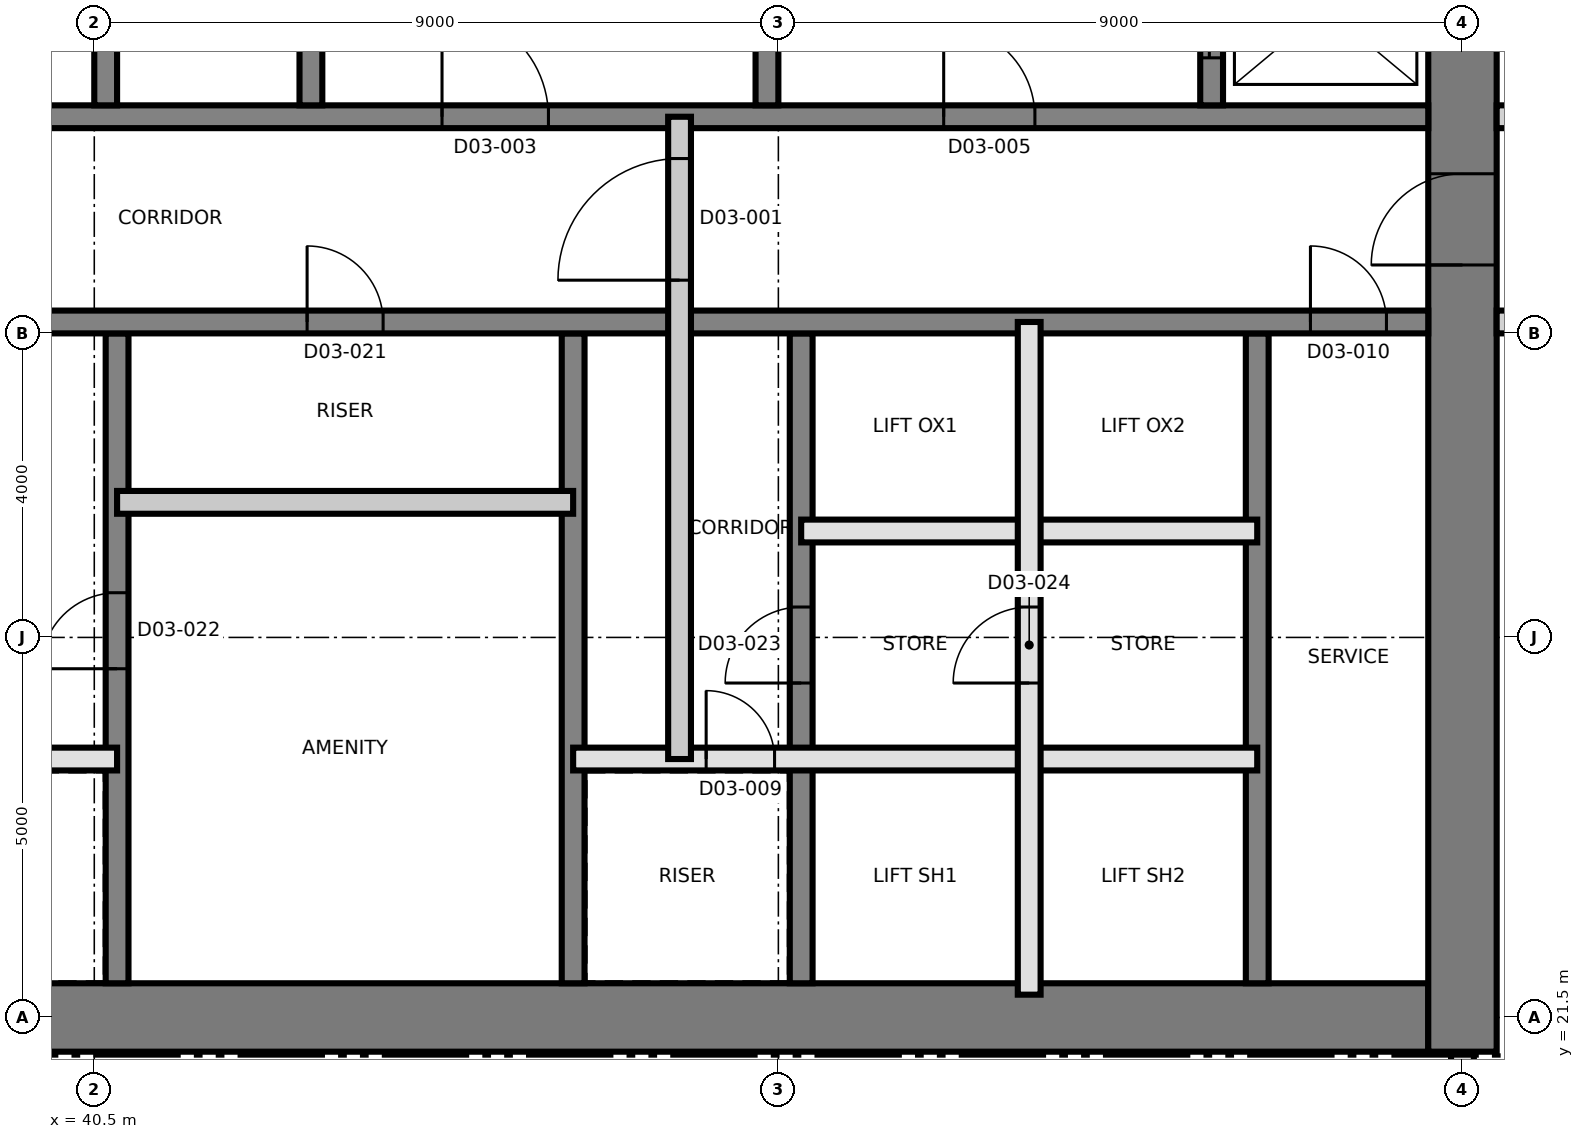
"""IFC4 building model, lengths in metres.
Left out: names, types, materials, properties, quantities, classifications, styles, units other than length and angle.
Written with IfcOpenShell. Run it as: python <this file> out.ifc"""

import sys

from ifc_helpers import new_model, si_unit, direction, frame, frame_2d, origin, place, context, subcontext, project, spatial, rectangle, extrude, element, fill, save


model = new_model("IFC4")
c1 = context("Model", 3, precision=1e-05, world=origin(), true_north=direction((0.0, 1.0)))
c2 = subcontext(c1, "Body", "Model", "MODEL_VIEW")
j1 = project(units=[si_unit("LENGTHUNIT", "METRE"), si_unit("PLANEANGLEUNIT", "RADIAN")], contexts=[c1])
p1 = place(None, origin())
s1 = spatial("IfcSite", under=j1, at=p1, CompositionType="ELEMENT")
p2 = place(p1, origin())
s2 = spatial("IfcBuilding", under=s1, at=p2, CompositionType="ELEMENT")
p3 = place(p2, frame((0.0, 0.0, 52.0)))
s3 = spatial("IfcBuildingStorey", under=s2, at=p3, CompositionType="ELEMENT", Elevation=52.0)
p4 = place(p3, frame((31.05, 21.5, 0.0), z_axis=(0.0, 0.0, 1.0), x_axis=(1.0, 0.0, 0.0)))
e1 = element("IfcWall", 1, at=p4, inside=s3, PredefinedType="SHEAR", context=c2, shape_type="SweptSolid", body=[
    extrude(rectangle(XDim=27.0, YDim=0.9, at=frame_2d((13.5, 0.0))), origin(), (0.0, 0.0, 1.0), 3.7),
])
p5 = place(p3, frame((58.5, 21.05, 0.0), z_axis=(0.0, 0.0, 1.0), x_axis=(0.0, 1.0, 0.0)))
e2 = element("IfcWall", 2, at=p5, inside=s3, PredefinedType="SHEAR", context=c2, shape_type="SweptSolid", body=[
    extrude(rectangle(XDim=18.9, YDim=0.9, at=frame_2d((9.45, 0.0))), origin(), (0.0, 0.0, 1.0), 3.7),
])
p6 = place(p5, frame((10.35, 0.0, 0.0)))
e3 = element("IfcOpeningElement", 3, at=p6, cuts=e2, PredefinedType="OPENING", context=c2, shape_type="SweptSolid", body=[
    extrude(rectangle(XDim=1.2, YDim=2.1, at=frame_2d((0.6, 1.05))), frame((0.0, 0.46, 0.0), z_axis=(0.0, -1.0, 0.0), x_axis=(1.0, 0.0, 0.0)), (0.0, 0.0, 1.0), 0.92),
])
p7 = place(p3, frame((40.8, 21.95, 0.0), z_axis=(0.0, 0.0, 1.0), x_axis=(0.0, 1.0, 0.0)))
e4 = element("IfcWall", 4, at=p7, inside=s3, PredefinedType="SHEAR", context=c2, shape_type="SweptSolid", body=[
    extrude(rectangle(XDim=8.55, YDim=0.3, at=frame_2d((4.275, 0.0))), origin(), (0.0, 0.0, 1.0), 3.7),
])
p8 = place(p7, frame((4.138, 0.0, 0.0)))
e5 = element("IfcOpeningElement", 5, at=p8, cuts=e4, PredefinedType="OPENING", context=c2, shape_type="SweptSolid", body=[
    extrude(rectangle(XDim=1.0, YDim=2.1, at=frame_2d((0.5, 1.05))), frame((0.0, 0.16, 0.0), z_axis=(0.0, -1.0, 0.0), x_axis=(1.0, 0.0, 0.0)), (0.0, 0.0, 1.0), 0.32),
])
p9 = place(p3, frame((46.8, 21.95, 0.0), z_axis=(0.0, 0.0, 1.0), x_axis=(0.0, 1.0, 0.0)))
e6 = element("IfcWall", 6, at=p9, inside=s3, PredefinedType="SHEAR", context=c2, shape_type="SweptSolid", body=[
    extrude(rectangle(XDim=8.55, YDim=0.3, at=frame_2d((4.275, 0.0))), origin(), (0.0, 0.0, 1.0), 3.7),
])
p10 = place(p3, frame((49.8, 21.95, 0.0), z_axis=(0.0, 0.0, 1.0), x_axis=(0.0, 1.0, 0.0)))
e7 = element("IfcWall", 7, at=p10, inside=s3, PredefinedType="SHEAR", context=c2, shape_type="SweptSolid", body=[
    extrude(rectangle(XDim=8.55, YDim=0.3, at=frame_2d((4.275, 0.0))), origin(), (0.0, 0.0, 1.0), 3.7),
])
p11 = place(p10, frame((3.95, 0.0, 0.0)))
e8 = element("IfcOpeningElement", 8, at=p11, cuts=e7, PredefinedType="OPENING", context=c2, shape_type="SweptSolid", body=[
    extrude(rectangle(XDim=1.0, YDim=2.1, at=frame_2d((0.5, 1.05))), frame((0.0, 0.16, 0.0), z_axis=(0.0, -1.0, 0.0), x_axis=(1.0, 0.0, 0.0)), (0.0, 0.0, 1.0), 0.32),
])
p12 = place(p3, frame((55.8, 21.95, 0.0), z_axis=(0.0, 0.0, 1.0), x_axis=(0.0, 1.0, 0.0)))
e9 = element("IfcWall", 9, at=p12, inside=s3, PredefinedType="SHEAR", context=c2, shape_type="SweptSolid", body=[
    extrude(rectangle(XDim=8.55, YDim=0.3, at=frame_2d((4.275, 0.0))), origin(), (0.0, 0.0, 1.0), 3.7),
])
p13 = place(p3, frame((31.95, 30.65, 0.0), z_axis=(0.0, 0.0, 1.0), x_axis=(1.0, 0.0, 0.0)))
e10 = element("IfcWall", 10, at=p13, inside=s3, PredefinedType="SHEAR", context=c2, shape_type="SweptSolid", body=[
    extrude(rectangle(XDim=26.1, YDim=0.3, at=frame_2d((13.05, 0.0))), origin(), (0.0, 0.0, 1.0), 3.7),
])
p14 = place(p13, frame((24.55, 0.0, 0.0)))
e11 = element("IfcOpeningElement", 11, at=p14, cuts=e10, PredefinedType="OPENING", context=c2, shape_type="SweptSolid", body=[
    extrude(rectangle(XDim=1.0, YDim=2.1, at=frame_2d((0.5, 1.05))), frame((0.0, 0.16, 0.0), z_axis=(0.0, -1.0, 0.0), x_axis=(1.0, 0.0, 0.0)), (0.0, 0.0, 1.0), 0.32),
])
p15 = place(p13, frame((11.35, 0.0, 0.0)))
e12 = element("IfcOpeningElement", 12, at=p15, cuts=e10, PredefinedType="OPENING", context=c2, shape_type="SweptSolid", body=[
    extrude(rectangle(XDim=1.0, YDim=2.1, at=frame_2d((0.5, 1.05))), frame((0.0, 0.16, 0.0), z_axis=(0.0, -1.0, 0.0), x_axis=(1.0, 0.0, 0.0)), (0.0, 0.0, 1.0), 0.32),
])
p16 = place(p3, frame((31.95, 33.35, 0.0), z_axis=(0.0, 0.0, 1.0), x_axis=(1.0, 0.0, 0.0)))
e13 = element("IfcWall", 13, at=p16, inside=s3, PredefinedType="SHEAR", context=c2, shape_type="SweptSolid", body=[
    extrude(rectangle(XDim=26.1, YDim=0.3, at=frame_2d((13.05, 0.0))), origin(), (0.0, 0.0, 1.0), 3.7),
])
p17 = place(p16, frame((13.125, 0.0, 0.0)))
e14 = element("IfcOpeningElement", 14, at=p17, cuts=e13, PredefinedType="OPENING", context=c2, shape_type="SweptSolid", body=[
    extrude(rectangle(XDim=1.4, YDim=2.1, at=frame_2d((0.7, 1.05))), frame((0.0, 0.16, 0.0), z_axis=(0.0, -1.0, 0.0), x_axis=(1.0, 0.0, 0.0)), (0.0, 0.0, 1.0), 0.32),
])
p18 = place(p16, frame((5.175, 0.0, 0.0)))
e15 = element("IfcOpeningElement", 15, at=p18, cuts=e13, PredefinedType="OPENING", context=c2, shape_type="SweptSolid", body=[
    extrude(rectangle(XDim=1.2, YDim=2.1, at=frame_2d((0.6, 1.05))), frame((0.0, 0.16, 0.0), z_axis=(0.0, -1.0, 0.0), x_axis=(1.0, 0.0, 0.0)), (0.0, 0.0, 1.0), 0.32),
])
p19 = place(p16, frame((19.725, 0.0, 0.0)))
e16 = element("IfcOpeningElement", 16, at=p19, cuts=e13, PredefinedType="OPENING", context=c2, shape_type="SweptSolid", body=[
    extrude(rectangle(XDim=1.2, YDim=2.1, at=frame_2d((0.6, 1.05))), frame((0.0, 0.16, 0.0), z_axis=(0.0, -1.0, 0.0), x_axis=(1.0, 0.0, 0.0)), (0.0, 0.0, 1.0), 0.32),
])
for number, where, z_axis, x_axis in (
    (17, (40.65, 33.5, 0.0), (0.0, 0.0, 1.0), (0.0, 1.0, 0.0)),
    (18, (43.35, 33.5, 0.0), (0.0, 0.0, 1.0), (0.0, 1.0, 0.0)),
    (19, (49.35, 33.5, 0.0), (0.0, 0.0, 1.0), (0.0, 1.0, 0.0)),
):
    element("IfcWall", number, at=place(p3, frame(where, z_axis=z_axis, x_axis=x_axis)), inside=s3, PredefinedType="SHEAR", context=c2, shape_type="SweptSolid", body=[
        extrude(rectangle(XDim=5.55, YDim=0.3, at=frame_2d((2.775, 0.0))), origin(), (0.0, 0.0, 1.0), 3.7),
    ])
p20 = place(p3, frame((55.2, 33.5, 0.0), z_axis=(0.0, 0.0, 1.0), x_axis=(0.0, 1.0, 0.0)))
e20 = element("IfcWall", 20, at=p20, inside=s3, PredefinedType="SHEAR", context=c2, shape_type="SweptSolid", body=[
    extrude(rectangle(XDim=2.55, YDim=0.3, at=frame_2d((1.275, 0.0))), origin(), (0.0, 0.0, 1.0), 3.7),
])
p21 = place(p20, frame((0.625, 0.0, 0.0)))
e21 = element("IfcOpeningElement", 21, at=p21, cuts=e20, PredefinedType="OPENING", context=c2, shape_type="SweptSolid", body=[
    extrude(rectangle(XDim=1.3, YDim=2.4, at=frame_2d((0.65, 1.2))), frame((0.0, 0.16, 0.0), z_axis=(0.0, -1.0, 0.0), x_axis=(1.0, 0.0, 0.0)), (0.0, 0.0, 1.0), 0.32),
])
p22 = place(p3, frame((31.8, 24.9, 0.0), z_axis=(0.0, 0.0, 1.0), x_axis=(1.0, 0.0, 0.0)))
e22 = element("IfcWall", 22, at=p22, inside=s3, PredefinedType="SOLIDWALL", context=c2, shape_type="SweptSolid", body=[
    extrude(rectangle(XDim=9.0, YDim=0.3, at=frame_2d((4.5, 0.0))), origin(), (0.0, 0.0, 1.0), 3.4),
])
p23 = place(p22, frame((7.05, 0.0, 0.0)))
e23 = element("IfcOpeningElement", 23, at=p23, cuts=e22, PredefinedType="OPENING", context=c2, shape_type="SweptSolid", body=[
    extrude(rectangle(XDim=0.9, YDim=2.1, at=frame_2d((0.45, 1.05))), frame((0.0, 0.16, 0.0), z_axis=(0.0, -1.0, 0.0), x_axis=(1.0, 0.0, 0.0)), (0.0, 0.0, 1.0), 0.32),
])
p24 = place(p22, frame((0.95, 0.0, 0.0)))
e24 = element("IfcOpeningElement", 24, at=p24, cuts=e22, PredefinedType="OPENING", context=c2, shape_type="SweptSolid", body=[
    extrude(rectangle(XDim=1.1, YDim=2.4, at=frame_2d((0.55, 1.2))), frame((0.0, 0.16, 0.0), z_axis=(0.0, -1.0, 0.0), x_axis=(1.0, 0.0, 0.0)), (0.0, 0.0, 1.0), 0.32),
])
p25 = place(p22, frame((3.95, 0.0, 0.0)))
e25 = element("IfcOpeningElement", 25, at=p25, cuts=e22, PredefinedType="OPENING", context=c2, shape_type="SweptSolid", body=[
    extrude(rectangle(XDim=1.1, YDim=2.4, at=frame_2d((0.55, 1.2))), frame((0.0, 0.16, 0.0), z_axis=(0.0, -1.0, 0.0), x_axis=(1.0, 0.0, 0.0)), (0.0, 0.0, 1.0), 0.32),
])
p26 = place(p3, frame((46.8, 24.9, 0.0), z_axis=(0.0, 0.0, 1.0), x_axis=(1.0, 0.0, 0.0)))
e26 = element("IfcWall", 26, at=p26, inside=s3, PredefinedType="SOLIDWALL", context=c2, shape_type="SweptSolid", body=[
    extrude(rectangle(XDim=9.0, YDim=0.3, at=frame_2d((4.5, 0.0))), origin(), (0.0, 0.0, 1.0), 3.4),
])
p27 = place(p26, frame((1.75, 0.0, 0.0)))
e27 = element("IfcOpeningElement", 27, at=p27, cuts=e26, PredefinedType="OPENING", context=c2, shape_type="SweptSolid", body=[
    extrude(rectangle(XDim=0.9, YDim=2.1, at=frame_2d((0.45, 1.05))), frame((0.0, 0.16, 0.0), z_axis=(0.0, -1.0, 0.0), x_axis=(1.0, 0.0, 0.0)), (0.0, 0.0, 1.0), 0.32),
])
p28 = place(p3, frame((49.8, 27.9, 0.0), z_axis=(0.0, 0.0, 1.0), x_axis=(1.0, 0.0, 0.0)))
e28 = element("IfcWall", 28, at=p28, inside=s3, PredefinedType="SOLIDWALL", context=c2, shape_type="SweptSolid", body=[
    extrude(rectangle(XDim=6.0, YDim=0.3, at=frame_2d((3.0, 0.0))), origin(), (0.0, 0.0, 1.0), 3.4),
])
p29 = place(p3, frame((40.8, 28.277, 0.0), z_axis=(0.0, 0.0, 1.0), x_axis=(1.0, 0.0, 0.0)))
e29 = element("IfcWall", 29, at=p29, inside=s3, PredefinedType="PARTITIONING", context=c2, shape_type="SweptSolid", body=[
    extrude(rectangle(XDim=6.0, YDim=0.3, at=frame_2d((3.0, 0.0))), origin(), (0.0, 0.0, 1.0), 3.4),
])
p30 = place(p3, frame((48.2, 24.9, 0.0), z_axis=(0.0, 0.0, 1.0), x_axis=(0.0, 1.0, 0.0)))
e30 = element("IfcWall", 30, at=p30, inside=s3, PredefinedType="PARTITIONING", context=c2, shape_type="SweptSolid", body=[
    extrude(rectangle(XDim=8.45, YDim=0.3, at=frame_2d((4.225, 0.0))), origin(), (0.0, 0.0, 1.0), 3.4),
])
p31 = place(p30, frame((6.3, 0.0, 0.0)))
e31 = element("IfcOpeningElement", 31, at=p31, cuts=e30, PredefinedType="OPENING", context=c2, shape_type="SweptSolid", body=[
    extrude(rectangle(XDim=1.6, YDim=2.1, at=frame_2d((0.8, 1.05))), frame((0.0, 0.16, 0.0), z_axis=(0.0, -1.0, 0.0), x_axis=(1.0, 0.0, 0.0)), (0.0, 0.0, 1.0), 0.32),
])
p32 = place(p3, frame((52.8, 21.8, 0.0), z_axis=(0.0, 0.0, 1.0), x_axis=(0.0, 1.0, 0.0)))
e32 = element("IfcWall", 32, at=p32, inside=s3, PredefinedType="SOLIDWALL", context=c2, shape_type="SweptSolid", body=[
    extrude(rectangle(XDim=8.85, YDim=0.3, at=frame_2d((4.425, 0.0))), origin(), (0.0, 0.0, 1.0), 3.4),
])
p33 = place(p32, frame((4.1, 0.0, 0.0)))
e33 = element("IfcOpeningElement", 33, at=p33, cuts=e32, PredefinedType="OPENING", context=c2, shape_type="SweptSolid", body=[
    extrude(rectangle(XDim=1.0, YDim=2.1, at=frame_2d((0.5, 1.05))), frame((0.0, 0.16, 0.0), z_axis=(0.0, -1.0, 0.0), x_axis=(1.0, 0.0, 0.0)), (0.0, 0.0, 1.0), 0.32),
])
p34 = place(p3, frame((58.95, 30.65, 0.0), z_axis=(0.0, 0.0, 1.0), x_axis=(1.0, 0.0, 0.0)))
e34 = element("IfcWall", 34, at=p34, inside=s3, PredefinedType="PARTITIONING", context=c2, shape_type="SweptSolid", body=[
    extrude(rectangle(XDim=26.38, YDim=0.3, at=frame_2d((13.19, 0.0))), origin(), (0.0, 0.0, 1.0), 3.4),
])
p35 = place(p34, frame((0.685, 0.0, 0.0)))
e35 = element("IfcOpeningElement", 35, at=p35, cuts=e34, PredefinedType="OPENING", context=c2, shape_type="SweptSolid", body=[
    extrude(rectangle(XDim=1.2, YDim=2.1, at=frame_2d((0.6, 1.05))), frame((0.0, 0.16, 0.0), z_axis=(0.0, -1.0, 0.0), x_axis=(1.0, 0.0, 0.0)), (0.0, 0.0, 1.0), 0.32),
])
p36 = place(p34, frame((3.935, 0.0, 0.0)))
e36 = element("IfcOpeningElement", 36, at=p36, cuts=e34, PredefinedType="OPENING", context=c2, shape_type="SweptSolid", body=[
    extrude(rectangle(XDim=1.0, YDim=2.1, at=frame_2d((0.5, 1.05))), frame((0.0, 0.16, 0.0), z_axis=(0.0, -1.0, 0.0), x_axis=(1.0, 0.0, 0.0)), (0.0, 0.0, 1.0), 0.32),
])
p37 = place(p34, frame((9.685, 0.0, 0.0)))
e37 = element("IfcOpeningElement", 37, at=p37, cuts=e34, PredefinedType="OPENING", context=c2, shape_type="SweptSolid", body=[
    extrude(rectangle(XDim=1.2, YDim=2.1, at=frame_2d((0.6, 1.05))), frame((0.0, 0.16, 0.0), z_axis=(0.0, -1.0, 0.0), x_axis=(1.0, 0.0, 0.0)), (0.0, 0.0, 1.0), 0.32),
])
p38 = place(p34, frame((12.935, 0.0, 0.0)))
e38 = element("IfcOpeningElement", 38, at=p38, cuts=e34, PredefinedType="OPENING", context=c2, shape_type="SweptSolid", body=[
    extrude(rectangle(XDim=1.0, YDim=2.1, at=frame_2d((0.5, 1.05))), frame((0.0, 0.16, 0.0), z_axis=(0.0, -1.0, 0.0), x_axis=(1.0, 0.0, 0.0)), (0.0, 0.0, 1.0), 0.32),
])
p39 = place(p34, frame((21.55, 0.0, 0.0)))
e39 = element("IfcOpeningElement", 39, at=p39, cuts=e34, PredefinedType="OPENING", context=c2, shape_type="SweptSolid", body=[
    extrude(rectangle(XDim=1.0, YDim=2.4, at=frame_2d((0.5, 1.2))), frame((0.0, 0.16, 0.0), z_axis=(0.0, -1.0, 0.0), x_axis=(1.0, 0.0, 0.0)), (0.0, 0.0, 1.0), 0.32),
])
p40 = place(p3, frame((58.95, 33.35, 0.0), z_axis=(0.0, 0.0, 1.0), x_axis=(1.0, 0.0, 0.0)))
e40 = element("IfcWall", 40, at=p40, inside=s3, PredefinedType="PARTITIONING", context=c2, shape_type="SweptSolid", body=[
    extrude(rectangle(XDim=26.38, YDim=0.3, at=frame_2d((13.19, 0.0))), origin(), (0.0, 0.0, 1.0), 3.4),
])
p41 = place(p40, frame((0.685, 0.0, 0.0)))
e41 = element("IfcOpeningElement", 41, at=p41, cuts=e40, PredefinedType="OPENING", context=c2, shape_type="SweptSolid", body=[
    extrude(rectangle(XDim=1.2, YDim=2.1, at=frame_2d((0.6, 1.05))), frame((0.0, 0.16, 0.0), z_axis=(0.0, -1.0, 0.0), x_axis=(1.0, 0.0, 0.0)), (0.0, 0.0, 1.0), 0.32),
])
p42 = place(p40, frame((3.935, 0.0, 0.0)))
e42 = element("IfcOpeningElement", 42, at=p42, cuts=e40, PredefinedType="OPENING", context=c2, shape_type="SweptSolid", body=[
    extrude(rectangle(XDim=1.0, YDim=2.1, at=frame_2d((0.5, 1.05))), frame((0.0, 0.16, 0.0), z_axis=(0.0, -1.0, 0.0), x_axis=(1.0, 0.0, 0.0)), (0.0, 0.0, 1.0), 0.32),
])
p43 = place(p40, frame((14.2, 0.0, 0.0)))
e43 = element("IfcOpeningElement", 43, at=p43, cuts=e40, PredefinedType="OPENING", context=c2, shape_type="SweptSolid", body=[
    extrude(rectangle(XDim=1.0, YDim=2.4, at=frame_2d((0.5, 1.2))), frame((0.0, 0.16, 0.0), z_axis=(0.0, -1.0, 0.0), x_axis=(1.0, 0.0, 0.0)), (0.0, 0.0, 1.0), 0.32),
])
p44 = place(p40, frame((19.25, 0.0, 0.0)))
e44 = element("IfcOpeningElement", 44, at=p44, cuts=e40, PredefinedType="OPENING", context=c2, shape_type="SweptSolid", body=[
    extrude(rectangle(XDim=1.2, YDim=2.1, at=frame_2d((0.6, 1.05))), frame((0.0, 0.16, 0.0), z_axis=(0.0, -1.0, 0.0), x_axis=(1.0, 0.0, 0.0)), (0.0, 0.0, 1.0), 0.32),
])
p45 = place(p40, frame((22.5, 0.0, 0.0)))
e45 = element("IfcOpeningElement", 45, at=p45, cuts=e40, PredefinedType="OPENING", context=c2, shape_type="SweptSolid", body=[
    extrude(rectangle(XDim=1.0, YDim=2.1, at=frame_2d((0.5, 1.05))), frame((0.0, 0.16, 0.0), z_axis=(0.0, -1.0, 0.0), x_axis=(1.0, 0.0, 0.0)), (0.0, 0.0, 1.0), 0.32),
])
p46 = place(p3, frame((58.5, 19.705, 0.0), z_axis=(0.0, 0.0, 1.0), x_axis=(0.0, 1.0, 0.0)))
e46 = element("IfcWall", 46, at=p46, inside=s3, PredefinedType="PARTITIONING", context=c2, shape_type="SweptSolid", body=[
    extrude(rectangle(XDim=1.325, YDim=0.3, at=frame_2d((0.663, 0.0))), origin(), (0.0, 0.0, 1.0), 3.4),
])
p47 = place(p31, origin())
e47 = element("IfcDoor", 47, at=p47, inside=s3, OperationType="SINGLE_SWING_LEFT", PredefinedType="DOOR", context=c2, shape_type="SweptSolid", body=[
    extrude(rectangle(XDim=1.6, YDim=2.1, at=frame_2d((0.8, 1.05))), frame((0.0, 0.025, 0.0), z_axis=(0.0, -1.0, 0.0), x_axis=(1.0, 0.0, 0.0)), (0.0, 0.0, 1.0), 0.05),
])
fill(e31, e47)
p48 = place(p17, origin())
e48 = element("IfcDoor", 48, at=p48, inside=s3, OperationType="SINGLE_SWING_RIGHT", PredefinedType="DOOR", context=c2, shape_type="SweptSolid", body=[
    extrude(rectangle(XDim=1.4, YDim=2.1, at=frame_2d((0.7, 1.05))), frame((0.0, 0.025, 0.0), z_axis=(0.0, -1.0, 0.0), x_axis=(1.0, 0.0, 0.0)), (0.0, 0.0, 1.0), 0.05),
])
fill(e14, e48)
p49 = place(p19, origin())
e49 = element("IfcDoor", 49, at=p49, inside=s3, OperationType="SINGLE_SWING_RIGHT", PredefinedType="DOOR", context=c2, shape_type="SweptSolid", body=[
    extrude(rectangle(XDim=1.2, YDim=2.1, at=frame_2d((0.6, 1.05))), frame((0.0, 0.025, 0.0), z_axis=(0.0, -1.0, 0.0), x_axis=(1.0, 0.0, 0.0)), (0.0, 0.0, 1.0), 0.05),
])
fill(e16, e49)
p50 = place(p27, origin())
e50 = element("IfcDoor", 50, at=p50, inside=s3, OperationType="SINGLE_SWING_RIGHT", PredefinedType="DOOR", context=c2, shape_type="SweptSolid", body=[
    extrude(rectangle(XDim=0.9, YDim=2.1, at=frame_2d((0.45, 1.05))), frame((0.0, 0.025, 0.0), z_axis=(0.0, -1.0, 0.0), x_axis=(1.0, 0.0, 0.0)), (0.0, 0.0, 1.0), 0.05),
])
fill(e27, e50)
p51 = place(p14, origin())
e51 = element("IfcDoor", 51, at=p51, inside=s3, OperationType="SINGLE_SWING_LEFT", PredefinedType="DOOR", context=c2, shape_type="SweptSolid", body=[
    extrude(rectangle(XDim=1.0, YDim=2.1, at=frame_2d((0.5, 1.05))), frame((0.0, 0.025, 0.0), z_axis=(0.0, -1.0, 0.0), x_axis=(1.0, 0.0, 0.0)), (0.0, 0.0, 1.0), 0.05),
])
fill(e11, e51)
p52 = place(p6, origin())
e52 = element("IfcDoor", 52, at=p52, inside=s3, OperationType="SINGLE_SWING_LEFT", PredefinedType="DOOR", context=c2, shape_type="SweptSolid", body=[
    extrude(rectangle(XDim=1.2, YDim=2.1, at=frame_2d((0.6, 1.05))), frame((0.0, 0.025, 0.0), z_axis=(0.0, -1.0, 0.0), x_axis=(1.0, 0.0, 0.0)), (0.0, 0.0, 1.0), 0.05),
])
fill(e3, e52)
p53 = place(p21, origin())
e53 = element("IfcDoor", 53, at=p53, inside=s3, OperationType="SLIDING_TO_LEFT", PredefinedType="DOOR", context=c2, shape_type="SweptSolid", body=[
    extrude(rectangle(XDim=1.3, YDim=2.4, at=frame_2d((0.65, 1.2))), frame((0.0, 0.025, 0.0), z_axis=(0.0, -1.0, 0.0), x_axis=(1.0, 0.0, 0.0)), (0.0, 0.0, 1.0), 0.05),
])
fill(e21, e53)
p54 = place(p15, origin())
e54 = element("IfcDoor", 54, at=p54, inside=s3, OperationType="SINGLE_SWING_LEFT", PredefinedType="DOOR", context=c2, shape_type="SweptSolid", body=[
    extrude(rectangle(XDim=1.0, YDim=2.1, at=frame_2d((0.5, 1.05))), frame((0.0, 0.025, 0.0), z_axis=(0.0, -1.0, 0.0), x_axis=(1.0, 0.0, 0.0)), (0.0, 0.0, 1.0), 0.05),
])
fill(e12, e54)
p55 = place(p8, origin())
e55 = element("IfcDoor", 55, at=p55, inside=s3, OperationType="SINGLE_SWING_RIGHT", PredefinedType="DOOR", context=c2, shape_type="SweptSolid", body=[
    extrude(rectangle(XDim=1.0, YDim=2.1, at=frame_2d((0.5, 1.05))), frame((0.0, 0.025, 0.0), z_axis=(0.0, -1.0, 0.0), x_axis=(1.0, 0.0, 0.0)), (0.0, 0.0, 1.0), 0.05),
])
fill(e5, e55)
p56 = place(p11, origin())
e56 = element("IfcDoor", 56, at=p56, inside=s3, OperationType="SINGLE_SWING_LEFT", PredefinedType="DOOR", context=c2, shape_type="SweptSolid", body=[
    extrude(rectangle(XDim=1.0, YDim=2.1, at=frame_2d((0.5, 1.05))), frame((0.0, 0.025, 0.0), z_axis=(0.0, -1.0, 0.0), x_axis=(1.0, 0.0, 0.0)), (0.0, 0.0, 1.0), 0.05),
])
fill(e8, e56)
p57 = place(p33, origin())
e57 = element("IfcDoor", 57, at=p57, inside=s3, OperationType="SINGLE_SWING_RIGHT", PredefinedType="DOOR", context=c2, shape_type="SweptSolid", body=[
    extrude(rectangle(XDim=1.0, YDim=2.1, at=frame_2d((0.5, 1.05))), frame((0.0, 0.025, 0.0), z_axis=(0.0, -1.0, 0.0), x_axis=(1.0, 0.0, 0.0)), (0.0, 0.0, 1.0), 0.05),
])
fill(e33, e57)
save(model, sys.argv[1])
